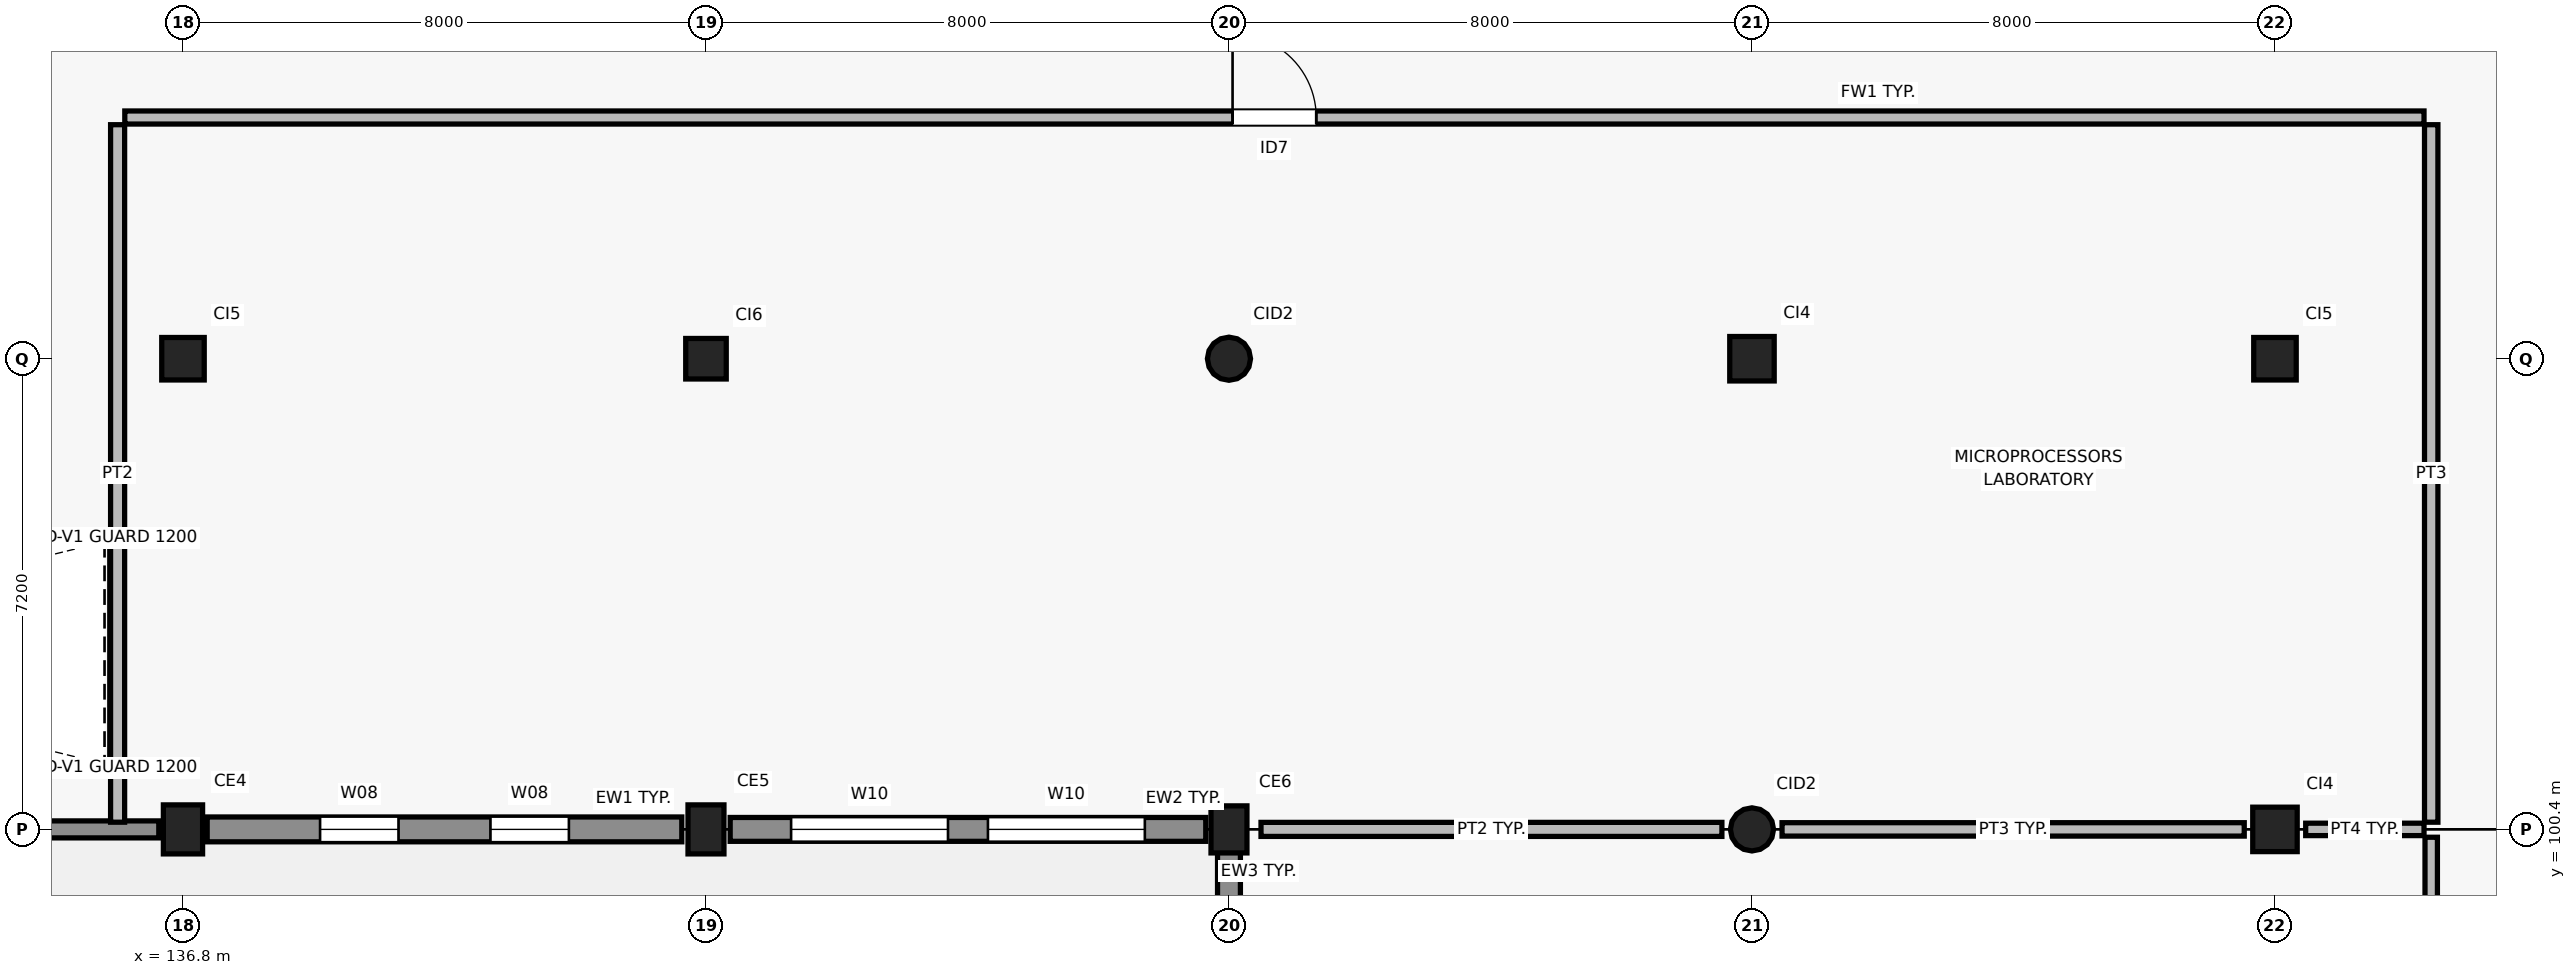
"""IFC4 building model, lengths in metres.
Left out: names, types, materials, properties, quantities, classifications, styles, units other than length and angle.
Written with IfcOpenShell. Run it as: python <this file> out.ifc"""

import sys

from ifc_helpers import new_model, si_unit, direction, frame, frame_2d, origin, origin_2d, place, context, subcontext, project, spatial, rectangle, circle, extrude, element, fill, save


model = new_model("IFC4")
c1 = context("Model", 3, precision=1e-05, world=origin(), true_north=direction((0.0, 1.0)))
c2 = subcontext(c1, "Body", "Model", "MODEL_VIEW")
j1 = project(units=[si_unit("LENGTHUNIT", "METRE"), si_unit("PLANEANGLEUNIT", "RADIAN")], contexts=[c1])
p1 = place(None, origin())
s1 = spatial("IfcSite", under=j1, at=p1, CompositionType="ELEMENT")
p2 = place(p1, origin())
s2 = spatial("IfcBuilding", under=s1, at=p2, CompositionType="ELEMENT")
p3 = place(p2, frame((0.0, 0.0, 4.5)))
s3 = spatial("IfcBuildingStorey", under=s2, at=p3, CompositionType="ELEMENT", Elevation=4.5)
p4 = place(p3, frame((136.8, 100.4, 0.0), z_axis=(0.0, 0.0, 1.0), x_axis=(1.0, 0.0, 0.0)))
e1 = element("IfcColumn", 1, at=p4, inside=s3, PredefinedType="COLUMN", context=c2, shape_type="SweptSolid", body=[
    extrude(rectangle(XDim=0.75, YDim=0.6, at=origin_2d()), origin(), (0.0, 0.0, 1.0), 4.5),
])
p5 = place(p3, frame((136.8, 107.6, 0.0), z_axis=(0.0, 0.0, 1.0), x_axis=(1.0, 0.0, 0.0)))
e2 = element("IfcColumn", 2, at=p5, inside=s3, PredefinedType="COLUMN", context=c2, shape_type="SweptSolid", body=[
    extrude(rectangle(XDim=0.65, YDim=0.65, at=origin_2d()), origin(), (0.0, 0.0, 1.0), 4.5),
])
p6 = place(p3, frame((144.8, 100.4, 0.0), z_axis=(0.0, 0.0, 1.0), x_axis=(1.0, 0.0, 0.0)))
e3 = element("IfcColumn", 3, at=p6, inside=s3, PredefinedType="COLUMN", context=c2, shape_type="SweptSolid", body=[
    extrude(rectangle(XDim=0.75, YDim=0.55, at=origin_2d()), origin(), (0.0, 0.0, 1.0), 4.5),
])
p7 = place(p3, frame((144.8, 107.6, 0.0), z_axis=(0.0, 0.0, 1.0), x_axis=(1.0, 0.0, 0.0)))
e4 = element("IfcColumn", 4, at=p7, inside=s3, PredefinedType="COLUMN", context=c2, shape_type="SweptSolid", body=[
    extrude(rectangle(XDim=0.62, YDim=0.62, at=origin_2d()), origin(), (0.0, 0.0, 1.0), 4.5),
])
p8 = place(p3, frame((152.8, 100.4, 0.0), z_axis=(0.0, 0.0, 1.0), x_axis=(1.0, 0.0, 0.0)))
e5 = element("IfcColumn", 5, at=p8, inside=s3, PredefinedType="COLUMN", context=c2, shape_type="SweptSolid", body=[
    extrude(rectangle(XDim=0.72, YDim=0.55, at=origin_2d()), origin(), (0.0, 0.0, 1.0), 4.5),
])
for number, where, z_axis, x_axis in (
    (6, (152.8, 107.6, 0.0), (0.0, 0.0, 1.0), (1.0, 0.0, 0.0)),
    (7, (160.8, 100.4, 0.0), (0.0, 0.0, 1.0), (1.0, 0.0, 0.0)),
):
    element("IfcColumn", number, at=place(p3, frame(where, z_axis=z_axis, x_axis=x_axis)), inside=s3, PredefinedType="COLUMN", context=c2, shape_type="SweptSolid", body=[
        extrude(circle(Radius=0.33, at=origin_2d()), origin(), (0.0, 0.0, 1.0), 4.5),
    ])
for number, where, z_axis, x_axis in (
    (8, (160.8, 107.6, 0.0), (0.0, 0.0, 1.0), (1.0, 0.0, 0.0)),
    (9, (168.8, 100.4, 0.0), (0.0, 0.0, 1.0), (1.0, 0.0, 0.0)),
):
    element("IfcColumn", number, at=place(p3, frame(where, z_axis=z_axis, x_axis=x_axis)), inside=s3, PredefinedType="COLUMN", context=c2, shape_type="SweptSolid", body=[
        extrude(rectangle(XDim=0.68, YDim=0.68, at=origin_2d()), origin(), (0.0, 0.0, 1.0), 4.5),
    ])
p9 = place(p3, frame((168.8, 107.6, 0.0), z_axis=(0.0, 0.0, 1.0), x_axis=(1.0, 0.0, 0.0)))
e10 = element("IfcColumn", 10, at=p9, inside=s3, PredefinedType="COLUMN", context=c2, shape_type="SweptSolid", body=[
    extrude(rectangle(XDim=0.65, YDim=0.65, at=origin_2d()), origin(), (0.0, 0.0, 1.0), 4.5),
])
p10 = place(p3, frame((129.102, 100.4, 0.0), z_axis=(0.0, 0.0, 1.0), x_axis=(1.0, 0.0, 0.0)))
e11 = element("IfcWall", 11, at=p10, inside=s3, PredefinedType="SOLIDWALL", context=c2, shape_type="SweptSolid", body=[
    extrude(rectangle(XDim=7.328, YDim=0.26, at=frame_2d((3.664, 0.0))), origin(), (0.0, 0.0, 1.0), 3.72),
])
p11 = place(p10, frame((3.139, 0.0, 0.0)))
e12 = element("IfcOpeningElement", 12, at=p11, cuts=e11, PredefinedType="OPENING", context=c2, shape_type="SweptSolid", body=[
    extrude(rectangle(XDim=1.05, YDim=2.15, at=frame_2d((0.525, 1.075))), frame((0.0, 0.14, 0.0), z_axis=(0.0, -1.0, 0.0), x_axis=(1.0, 0.0, 0.0)), (0.0, 0.0, 1.0), 0.28),
])
p12 = place(p3, frame((137.17, 100.4, 0.0), z_axis=(0.0, 0.0, 1.0), x_axis=(1.0, 0.0, 0.0)))
e13 = element("IfcWall", 13, at=p12, inside=s3, PredefinedType="SOLIDWALL", context=c2, shape_type="SweptSolid", body=[
    extrude(rectangle(XDim=7.26, YDim=0.38, at=frame_2d((3.63, 0.0))), origin(), (0.0, 0.0, 1.0), 3.57),
])
p13 = place(p12, frame((1.727, 0.0, 0.9)))
e14 = element("IfcOpeningElement", 14, at=p13, cuts=e13, PredefinedType="OPENING", context=c2, shape_type="SweptSolid", body=[
    extrude(rectangle(XDim=1.2, YDim=1.8, at=frame_2d((0.6, 0.9))), frame((0.0, 0.2, 0.0), z_axis=(0.0, -1.0, 0.0), x_axis=(1.0, 0.0, 0.0)), (0.0, 0.0, 1.0), 0.4),
])
p14 = place(p12, frame((4.333, 0.0, 0.9)))
e15 = element("IfcOpeningElement", 15, at=p14, cuts=e13, PredefinedType="OPENING", context=c2, shape_type="SweptSolid", body=[
    extrude(rectangle(XDim=1.2, YDim=1.8, at=frame_2d((0.6, 0.9))), frame((0.0, 0.2, 0.0), z_axis=(0.0, -1.0, 0.0), x_axis=(1.0, 0.0, 0.0)), (0.0, 0.0, 1.0), 0.4),
])
p15 = place(p3, frame((145.17, 100.4, 0.0), z_axis=(0.0, 0.0, 1.0), x_axis=(1.0, 0.0, 0.0)))
e16 = element("IfcWall", 16, at=p15, inside=s3, PredefinedType="SOLIDWALL", context=c2, shape_type="SweptSolid", body=[
    extrude(rectangle(XDim=7.275, YDim=0.365, at=frame_2d((3.638, 0.0))), origin(), (0.0, 0.0, 1.0), 3.57),
])
p16 = place(p15, frame((0.932, 0.0, 0.9)))
e17 = element("IfcOpeningElement", 17, at=p16, cuts=e16, PredefinedType="OPENING", context=c2, shape_type="SweptSolid", body=[
    extrude(rectangle(XDim=2.4, YDim=1.5, at=frame_2d((1.2, 0.75))), frame((0.0, 0.192, 0.0), z_axis=(0.0, -1.0, 0.0), x_axis=(1.0, 0.0, 0.0)), (0.0, 0.0, 1.0), 0.385),
])
p17 = place(p15, frame((3.943, 0.0, 0.9)))
e18 = element("IfcOpeningElement", 18, at=p17, cuts=e16, PredefinedType="OPENING", context=c2, shape_type="SweptSolid", body=[
    extrude(rectangle(XDim=2.4, YDim=1.5, at=frame_2d((1.2, 0.75))), frame((0.0, 0.192, 0.0), z_axis=(0.0, -1.0, 0.0), x_axis=(1.0, 0.0, 0.0)), (0.0, 0.0, 1.0), 0.385),
])
p18 = place(p3, frame((152.8, 100.13, 0.0), z_axis=(0.0, 0.0, 1.0), x_axis=(0.0, -1.0, 0.0)))
e19 = element("IfcWall", 19, at=p18, inside=s3, PredefinedType="SOLIDWALL", context=c2, shape_type="SweptSolid", body=[
    extrude(rectangle(XDim=6.66, YDim=0.35, at=frame_2d((3.33, 0.0))), origin(), (0.0, 0.0, 1.0), 3.7),
])
p19 = place(p18, frame((0.993, 0.0, 0.9)))
e20 = element("IfcOpeningElement", 20, at=p19, cuts=e19, PredefinedType="OPENING", context=c2, shape_type="SweptSolid", body=[
    extrude(rectangle(XDim=2.0, YDim=1.5, at=frame_2d((1.0, 0.75))), frame((0.0, 0.185, 0.0), z_axis=(0.0, -1.0, 0.0), x_axis=(1.0, 0.0, 0.0)), (0.0, 0.0, 1.0), 0.37),
])
p20 = place(p18, frame((3.667, 0.0, 0.9)))
e21 = element("IfcOpeningElement", 21, at=p20, cuts=e19, PredefinedType="OPENING", context=c2, shape_type="SweptSolid", body=[
    extrude(rectangle(XDim=2.0, YDim=1.5, at=frame_2d((1.0, 0.75))), frame((0.0, 0.185, 0.0), z_axis=(0.0, -1.0, 0.0), x_axis=(1.0, 0.0, 0.0)), (0.0, 0.0, 1.0), 0.37),
])
p21 = place(p3, frame((153.29, 100.4, 0.0), z_axis=(0.0, 0.0, 1.0), x_axis=(1.0, 0.0, 0.0)))
e22 = element("IfcWall", 22, at=p21, inside=s3, PredefinedType="PARTITIONING", context=c2, shape_type="SweptSolid", body=[
    extrude(rectangle(XDim=7.05, YDim=0.215, at=frame_2d((3.525, 0.0))), origin(), (0.0, 0.0, 1.0), 3.5),
])
p22 = place(p3, frame((161.26, 100.4, 0.0), z_axis=(0.0, 0.0, 1.0), x_axis=(1.0, 0.0, 0.0)))
e23 = element("IfcWall", 23, at=p22, inside=s3, PredefinedType="PARTITIONING", context=c2, shape_type="SweptSolid", body=[
    extrude(rectangle(XDim=7.07, YDim=0.205, at=frame_2d((3.535, 0.0))), origin(), (0.0, 0.0, 1.0), 3.56),
])
p23 = place(p3, frame((169.27, 100.4, 0.0), z_axis=(0.0, 0.0, 1.0), x_axis=(1.0, 0.0, 0.0)))
e24 = element("IfcWall", 24, at=p23, inside=s3, PredefinedType="PARTITIONING", context=c2, shape_type="SweptSolid", body=[
    extrude(rectangle(XDim=1.81, YDim=0.19, at=frame_2d((0.905, 0.0))), origin(), (0.0, 0.0, 1.0), 3.57),
])
p24 = place(p3, frame((135.91, 111.29, 0.0), z_axis=(0.0, 0.0, 1.0), x_axis=(1.0, 0.0, 0.0)))
e25 = element("IfcWall", 25, at=p24, inside=s3, PredefinedType="SOLIDWALL", context=c2, shape_type="SweptSolid", body=[
    extrude(rectangle(XDim=35.17, YDim=0.2, at=frame_2d((17.585, 0.0))), origin(), (0.0, 0.0, 1.0), 3.76),
])
p25 = place(p24, frame((16.945, 0.0, 0.0)))
e26 = element("IfcOpeningElement", 26, at=p25, cuts=e25, PredefinedType="OPENING", context=c2, shape_type="SweptSolid", body=[
    extrude(rectangle(XDim=1.28, YDim=2.2, at=frame_2d((0.64, 1.1))), frame((0.0, 0.11, 0.0), z_axis=(0.0, -1.0, 0.0), x_axis=(1.0, 0.0, 0.0)), (0.0, 0.0, 1.0), 0.22),
])
p26 = place(p3, frame((135.8, 100.51, 0.0), z_axis=(0.0, 0.0, 1.0), x_axis=(0.0, 1.0, 0.0)))
e27 = element("IfcWall", 27, at=p26, inside=s3, PredefinedType="PARTITIONING", context=c2, shape_type="SweptSolid", body=[
    extrude(rectangle(XDim=10.67, YDim=0.215, at=frame_2d((5.335, 0.0))), origin(), (0.0, 0.0, 1.0), 4.2),
])
p27 = place(p3, frame((171.19, 100.51, 0.0), z_axis=(0.0, 0.0, 1.0), x_axis=(0.0, 1.0, 0.0)))
e28 = element("IfcWall", 28, at=p27, inside=s3, PredefinedType="PARTITIONING", context=c2, shape_type="SweptSolid", body=[
    extrude(rectangle(XDim=10.67, YDim=0.205, at=frame_2d((5.335, 0.0))), origin(), (0.0, 0.0, 1.0), 4.2),
])
p28 = place(p3, frame((171.19, 70.12, 0.0), z_axis=(0.0, 0.0, 1.0), x_axis=(0.0, 1.0, 0.0)))
e29 = element("IfcWall", 29, at=p28, inside=s3, PredefinedType="PARTITIONING", context=c2, shape_type="SweptSolid", body=[
    extrude(rectangle(XDim=30.16, YDim=0.19, at=frame_2d((15.08, 0.0))), origin(), (0.0, 0.0, 1.0), 4.2),
])
p29 = place(p28, frame((14.405, 0.0, 0.0)))
e30 = element("IfcOpeningElement", 30, at=p29, cuts=e29, PredefinedType="OPENING", context=c2, shape_type="SweptSolid", body=[
    extrude(rectangle(XDim=1.35, YDim=2.2, at=frame_2d((0.675, 1.1))), frame((0.0, 0.105, 0.0), z_axis=(0.0, -1.0, 0.0), x_axis=(1.0, 0.0, 0.0)), (0.0, 0.0, 1.0), 0.21),
])
p30 = place(p13, origin())
e31 = element("IfcWindow", 31, at=p30, inside=s3, PartitioningType="SINGLE_PANEL", PredefinedType="WINDOW", context=c2, shape_type="SweptSolid", body=[
    extrude(rectangle(XDim=1.2, YDim=1.8, at=frame_2d((0.6, 0.9))), frame((0.0, 0.03, 0.0), z_axis=(0.0, -1.0, 0.0), x_axis=(1.0, 0.0, 0.0)), (0.0, 0.0, 1.0), 0.06),
])
fill(e14, e31)
p31 = place(p14, origin())
e32 = element("IfcWindow", 32, at=p31, inside=s3, PartitioningType="SINGLE_PANEL", PredefinedType="WINDOW", context=c2, shape_type="SweptSolid", body=[
    extrude(rectangle(XDim=1.2, YDim=1.8, at=frame_2d((0.6, 0.9))), frame((0.0, 0.03, 0.0), z_axis=(0.0, -1.0, 0.0), x_axis=(1.0, 0.0, 0.0)), (0.0, 0.0, 1.0), 0.06),
])
fill(e15, e32)
p32 = place(p16, origin())
e33 = element("IfcWindow", 33, at=p32, inside=s3, PartitioningType="SINGLE_PANEL", PredefinedType="WINDOW", context=c2, shape_type="SweptSolid", body=[
    extrude(rectangle(XDim=2.4, YDim=1.5, at=frame_2d((1.2, 0.75))), frame((0.0, 0.03, 0.0), z_axis=(0.0, -1.0, 0.0), x_axis=(1.0, 0.0, 0.0)), (0.0, 0.0, 1.0), 0.06),
])
fill(e17, e33)
p33 = place(p17, origin())
e34 = element("IfcWindow", 34, at=p33, inside=s3, PartitioningType="SINGLE_PANEL", PredefinedType="WINDOW", context=c2, shape_type="SweptSolid", body=[
    extrude(rectangle(XDim=2.4, YDim=1.5, at=frame_2d((1.2, 0.75))), frame((0.0, 0.03, 0.0), z_axis=(0.0, -1.0, 0.0), x_axis=(1.0, 0.0, 0.0)), (0.0, 0.0, 1.0), 0.06),
])
fill(e18, e34)
p34 = place(p25, origin())
e35 = element("IfcDoor", 35, at=p34, inside=s3, OperationType="SINGLE_SWING_LEFT", PredefinedType="DOOR", context=c2, shape_type="SweptSolid", body=[
    extrude(rectangle(XDim=1.28, YDim=2.2, at=frame_2d((0.64, 1.1))), frame((0.0, 0.025, 0.0), z_axis=(0.0, -1.0, 0.0), x_axis=(1.0, 0.0, 0.0)), (0.0, 0.0, 1.0), 0.05),
])
fill(e26, e35)
save(model, sys.argv[1])
